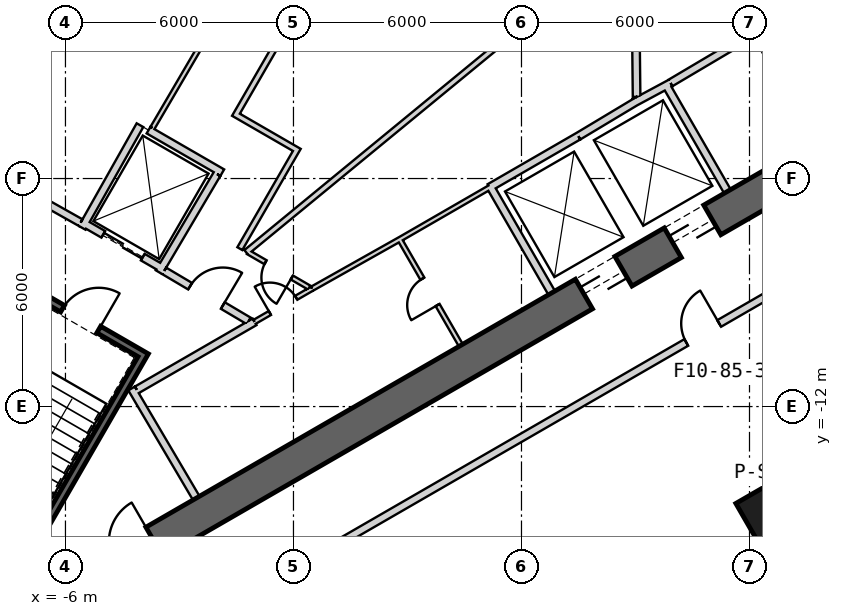
"""IFC4 building model, lengths in metres.
Left out: names, types, materials, properties, quantities, classifications, styles, units other than length and angle.
Written with IfcOpenShell. Run it as: python <this file> out.ifc"""

import sys

from ifc_helpers import new_model, si_unit, direction, frame, frame_2d, origin, origin_2d, place, context, subcontext, project, spatial, rectangle, extrude, element, fill, save


model = new_model("IFC4")
c1 = context("Model", 3, precision=1e-05, world=origin(), true_north=direction((0.0, 1.0)))
c2 = subcontext(c1, "Body", "Model", "MODEL_VIEW")
j1 = project(units=[si_unit("LENGTHUNIT", "METRE"), si_unit("PLANEANGLEUNIT", "RADIAN")], contexts=[c1])
p1 = place(None, origin())
s1 = spatial("IfcSite", under=j1, at=p1, CompositionType="ELEMENT")
p2 = place(p1, origin())
s2 = spatial("IfcBuilding", under=s1, at=p2, CompositionType="ELEMENT")
p3 = place(p2, frame((0.0, 0.0, 368.9)))
s3 = spatial("IfcBuildingStorey", under=s2, at=p3, CompositionType="ELEMENT", Elevation=368.9)
p4 = place(p3, frame((12.359, -14.942, 0.0), z_axis=(0.0, 0.0, 1.0), x_axis=(0.5, -0.866025403784, 0.0)))
e1 = element("IfcColumn", 1, at=p4, inside=s3, PredefinedType="COLUMN", context=c2, shape_type="SweptSolid", body=[
    extrude(rectangle(XDim=1.4, YDim=0.85, at=origin_2d()), origin(), (0.0, 0.0, 1.0), 3.9),
])
p5 = place(p3, frame((-7.825, -17.97, 0.0), z_axis=(0.0, 0.0, 1.0), x_axis=(0.866028369851, 0.499994862586, 0.0)))
e2 = element("IfcWall", 2, at=p5, inside=s3, PredefinedType="SHEAR", context=c2, shape_type="SweptSolid", body=[
    extrude(rectangle(XDim=31.523, YDim=0.9, at=frame_2d((15.762, 0.0))), origin(), (0.0, 0.0, 1.0), 3.9),
])
p6 = place(p5, frame((17.862, 0.0, 0.0)))
e3 = element("IfcOpeningElement", 3, at=p6, cuts=e2, PredefinedType="OPENING", context=c2, shape_type="SweptSolid", body=[
    extrude(rectangle(XDim=1.2, YDim=2.4, at=frame_2d((0.6, 1.2))), frame((0.0, 0.46, 0.0), z_axis=(0.0, -1.0, 0.0), x_axis=(1.0, 0.0, 0.0)), (0.0, 0.0, 1.0), 0.92),
])
p7 = place(p5, frame((20.562, 0.0, 0.0)))
e4 = element("IfcOpeningElement", 4, at=p7, cuts=e2, PredefinedType="OPENING", context=c2, shape_type="SweptSolid", body=[
    extrude(rectangle(XDim=1.2, YDim=2.4, at=frame_2d((0.6, 1.2))), frame((0.0, 0.46, 0.0), z_axis=(0.0, -1.0, 0.0), x_axis=(1.0, 0.0, 0.0)), (0.0, 0.0, 1.0), 0.92),
])
p8 = place(p5, frame((26.712, 0.0, 0.0)))
e5 = element("IfcOpeningElement", 5, at=p8, cuts=e2, PredefinedType="OPENING", context=c2, shape_type="SweptSolid", body=[
    extrude(rectangle(XDim=1.2, YDim=2.4, at=frame_2d((0.6, 1.2))), frame((0.0, 0.46, 0.0), z_axis=(0.0, -1.0, 0.0), x_axis=(1.0, 0.0, 0.0)), (0.0, 0.0, 1.0), 0.92),
])
p9 = place(p5, frame((3.612, 0.0, 0.0)))
e6 = element("IfcOpeningElement", 6, at=p9, cuts=e2, PredefinedType="OPENING", context=c2, shape_type="SweptSolid", body=[
    extrude(rectangle(XDim=1.2, YDim=2.4, at=frame_2d((0.6, 1.2))), frame((0.0, 0.46, 0.0), z_axis=(0.0, -1.0, 0.0), x_axis=(1.0, 0.0, 0.0)), (0.0, 0.0, 1.0), 0.92),
])
p10 = place(p3, frame((6.795, -9.01, 0.0), z_axis=(0.0, 0.0, 1.0), x_axis=(-0.499984717929, 0.866034226713, 0.0)))
e7 = element("IfcWall", 7, at=p10, inside=s3, PredefinedType="PLUMBINGWALL", context=c2, shape_type="SweptSolid", body=[
    extrude(rectangle(XDim=3.25, YDim=0.2, at=frame_2d((1.625, 0.0))), origin(), (0.0, 0.0, 1.0), 3.6),
])
p11 = place(p3, frame((5.159, -6.236, 0.0), z_axis=(0.0, 0.0, 1.0), x_axis=(0.866036505625, 0.499980770555, 0.0)))
e8 = element("IfcWall", 8, at=p11, inside=s3, PredefinedType="PLUMBINGWALL", context=c2, shape_type="SweptSolid", body=[
    extrude(rectangle(XDim=2.7, YDim=0.2, at=frame_2d((1.35, 0.0))), origin(), (0.0, 0.0, 1.0), 3.6),
])
p12 = place(p3, frame((9.795, -3.525, 0.0), z_axis=(0.0, 0.0, 1.0), x_axis=(0.499984717929, -0.866034226713, 0.0)))
e9 = element("IfcWall", 9, at=p12, inside=s3, PredefinedType="PLUMBINGWALL", context=c2, shape_type="SweptSolid", body=[
    extrude(rectangle(XDim=3.25, YDim=0.2, at=frame_2d((1.625, 0.0))), origin(), (0.0, 0.0, 1.0), 3.6),
])
p13 = place(p3, frame((8.974, -3.999, 0.0), z_axis=(0.0, 0.0, 1.0), x_axis=(0.880907015104, 0.473289373154, 0.0)))
e10 = element("IfcWall", 10, at=p13, inside=s3, PredefinedType="PLUMBINGWALL", context=c2, shape_type="SweptSolid", body=[
    extrude(rectangle(XDim=1.078, YDim=0.2, at=frame_2d((0.539, 0.0))), origin(), (0.0, 0.0, 1.0), 3.6),
])
p14 = place(p3, frame((7.493, -4.878, 0.0), z_axis=(0.0, 0.0, 1.0), x_axis=(0.859981807212, 0.510324691999, 0.0)))
e11 = element("IfcWall", 11, at=p14, inside=s3, PredefinedType="PLUMBINGWALL", context=c2, shape_type="SweptSolid", body=[
    extrude(rectangle(XDim=1.845, YDim=0.2, at=frame_2d((0.922, 0.0))), origin(), (0.0, 0.0, 1.0), 3.6),
])
p15 = place(p3, frame((-3.905, -10.563, -0.3), z_axis=(0.0, 0.0, 1.0), x_axis=(-0.500012932018, -0.866017937352, 0.0)))
e12 = element("IfcWall", 12, at=p15, inside=s3, PredefinedType="SHEAR", context=c2, shape_type="SweptSolid", body=[
    extrude(rectangle(XDim=8.1, YDim=0.2, at=frame_2d((4.05, 0.0))), origin(), (0.0, 0.0, 1.0), 3.9),
])
p16 = place(p3, frame((-4.041, -10.599, -0.3), z_axis=(0.0, 0.0, 1.0), x_axis=(-0.866047807691, 0.499961193289, 0.0)))
e13 = element("IfcWall", 13, at=p16, inside=s3, PredefinedType="SHEAR", context=c2, shape_type="SweptSolid", body=[
    extrude(rectangle(XDim=3.6, YDim=0.2, at=frame_2d((1.8, 0.0))), origin(), (0.0, 0.0, 1.0), 3.9),
])
p17 = place(p16, frame((1.25, 0.0, 0.3)))
e14 = element("IfcOpeningElement", 14, at=p17, cuts=e13, PredefinedType="OPENING", context=c2, shape_type="SweptSolid", body=[
    extrude(rectangle(XDim=1.1, YDim=2.1, at=frame_2d((0.55, 1.05))), frame((0.0, 0.11, 0.0), z_axis=(0.0, -1.0, 0.0), x_axis=(1.0, 0.0, 0.0)), (0.0, 0.0, 1.0), 0.22),
])
p18 = place(p3, frame((-3.446, -8.368, 0.0), z_axis=(0.0, 0.0, 1.0), x_axis=(-0.866024647952, 0.500001309137, 0.0)))
e15 = element("IfcWall", 15, at=p18, inside=s3, PredefinedType="PLUMBINGWALL", context=c2, shape_type="SweptSolid", body=[
    extrude(rectangle(XDim=2.4, YDim=0.2, at=frame_2d((1.2, 0.0))), origin(), (0.0, 0.0, 1.0), 3.6),
])
p19 = place(p18, frame((0.6, 0.0, 0.0)))
e16 = element("IfcOpeningElement", 16, at=p19, cuts=e15, PredefinedType="OPENING", context=c2, shape_type="SweptSolid", body=[
    extrude(rectangle(XDim=1.2, YDim=2.4, at=frame_2d((0.6, 1.2))), frame((0.0, 0.11, 0.0), z_axis=(0.0, -1.0, 0.0), x_axis=(1.0, 0.0, 0.0)), (0.0, 0.0, 1.0), 0.22),
])
p20 = place(p3, frame((-1.961, -5.796, 0.0), z_axis=(0.0, 0.0, 1.0), x_axis=(-0.508647062354, -0.860975125052, 0.0)))
e17 = element("IfcWall", 17, at=p20, inside=s3, PredefinedType="PLUMBINGWALL", context=c2, shape_type="SweptSolid", body=[
    extrude(rectangle(XDim=3.1, YDim=0.2, at=frame_2d((1.55, 0.0))), origin(), (0.0, 0.0, 1.0), 3.6),
])
p21 = place(p3, frame((-3.99, -4.509, 0.0), z_axis=(0.0, 0.0, 1.0), x_axis=(-0.491358283181, -0.870957540612, 0.0)))
e18 = element("IfcWall", 18, at=p21, inside=s3, PredefinedType="PLUMBINGWALL", context=c2, shape_type="SweptSolid", body=[
    extrude(rectangle(XDim=3.2, YDim=0.2, at=frame_2d((1.6, 0.0))), origin(), (0.0, 0.0, 1.0), 3.6),
])
p22 = place(p3, frame((-3.953, -4.646, 0.0), z_axis=(0.0, 0.0, 1.0), x_axis=(0.866065302921, -0.4999308863, 0.0)))
e19 = element("IfcWall", 19, at=p22, inside=s3, PredefinedType="PLUMBINGWALL", context=c2, shape_type="SweptSolid", body=[
    extrude(rectangle(XDim=2.264, YDim=0.2, at=frame_2d((1.132, 0.0))), origin(), (0.0, 0.0, 1.0), 3.6),
])
p23 = place(p3, frame((2.067, -11.74, 0.0), z_axis=(0.0, 0.0, 1.0), x_axis=(-0.499984717929, 0.866034226713, 0.0)))
e20 = element("IfcWall", 20, at=p23, inside=s3, PredefinedType="PARTITIONING", context=c2, shape_type="SweptSolid", body=[
    extrude(rectangle(XDim=3.25, YDim=0.12, at=frame_2d((1.625, 0.0))), origin(), (0.0, 0.0, 1.0), 3.6),
])
p24 = place(p3, frame((-4.26, -11.524, 0.0), z_axis=(0.0, 0.0, 1.0), x_axis=(0.507997497166, -0.861358544901, 0.0)))
e21 = element("IfcWall", 21, at=p24, inside=s3, PredefinedType="PARTITIONING", context=c2, shape_type="SweptSolid", body=[
    extrude(rectangle(XDim=3.35, YDim=0.2, at=frame_2d((1.675, 0.0))), origin(), (0.0, 0.0, 1.0), 3.6),
])
p25 = place(p3, frame((-1.024, -9.771, 0.0), z_axis=(0.0, 0.0, 1.0), x_axis=(-0.866029903013, -0.499992207027, 0.0)))
e22 = element("IfcWall", 22, at=p25, inside=s3, PredefinedType="PARTITIONING", context=c2, shape_type="SweptSolid", body=[
    extrude(rectangle(XDim=3.578, YDim=0.2, at=frame_2d((1.789, 0.0))), origin(), (0.0, 0.0, 1.0), 3.6),
])
p26 = place(p25, frame((1.389, 0.0, 0.0)))
e23 = element("IfcOpeningElement", 23, at=p26, cuts=e22, PredefinedType="OPENING", context=c2, shape_type="SweptSolid", body=[
    extrude(rectangle(XDim=0.8, YDim=2.1, at=frame_2d((0.4, 1.05))), frame((0.0, 0.11, 0.0), z_axis=(0.0, -1.0, 0.0), x_axis=(1.0, 0.0, 0.0)), (0.0, 0.0, 1.0), 0.22),
])
p27 = place(p3, frame((-1.023, -9.772, 0.0), z_axis=(0.0, 0.0, 1.0), x_axis=(0.874290944206, 0.485402250592, 0.0)))
e24 = element("IfcWall", 24, at=p27, inside=s3, PredefinedType="PARTITIONING", context=c2, shape_type="SweptSolid", body=[
    extrude(rectangle(XDim=1.723, YDim=0.12, at=frame_2d((0.861, 0.0))), origin(), (0.0, 0.0, 1.0), 3.6),
])
p28 = place(p3, frame((0.483, -8.936, 0.0), z_axis=(0.0, 0.0, 1.0), x_axis=(0.866028230842, 0.499995103361, 0.0)))
e25 = element("IfcWall", 25, at=p28, inside=s3, PredefinedType="PARTITIONING", context=c2, shape_type="SweptSolid", body=[
    extrude(rectangle(XDim=5.4, YDim=0.12, at=frame_2d((2.7, 0.0))), origin(), (0.0, 0.0, 1.0), 3.6),
])
p29 = place(p28, frame((2.3, 0.0, 0.0)))
e26 = element("IfcOpeningElement", 26, at=p29, cuts=e25, PredefinedType="OPENING", context=c2, shape_type="SweptSolid", body=[
    extrude(rectangle(XDim=0.8, YDim=2.1, at=frame_2d((0.4, 1.05))), frame((0.0, 0.07, 0.0), z_axis=(0.0, -1.0, 0.0), x_axis=(1.0, 0.0, 0.0)), (0.0, 0.0, 1.0), 0.14),
])
p30 = place(p3, frame((12.245, -2.109, 0.0), z_axis=(0.0, 0.0, 1.0), x_axis=(-0.860414880418, -0.509594185166, 0.0)))
e27 = element("IfcWall", 27, at=p30, inside=s3, PredefinedType="PARTITIONING", context=c2, shape_type="SweptSolid", body=[
    extrude(rectangle(XDim=2.7, YDim=0.2, at=frame_2d((1.35, 0.0))), origin(), (0.0, 0.0, 1.0), 3.6),
])
p31 = place(p3, frame((13.758, -4.99, 0.0), z_axis=(0.0, 0.0, 1.0), x_axis=(-0.491993409184, 0.87059892334, 0.0)))
e28 = element("IfcWall", 28, at=p31, inside=s3, PredefinedType="PARTITIONING", context=c2, shape_type="SweptSolid", body=[
    extrude(rectangle(XDim=3.15, YDim=0.2, at=frame_2d((1.575, 0.0))), origin(), (0.0, 0.0, 1.0), 3.6),
])
p32 = place(p31, frame((1.175, 0.0, 0.0)))
e29 = element("IfcOpeningElement", 29, at=p32, cuts=e28, PredefinedType="OPENING", context=c2, shape_type="SweptSolid", body=[
    extrude(rectangle(XDim=0.8, YDim=2.1, at=frame_2d((0.4, 1.05))), frame((0.0, 0.11, 0.0), z_axis=(0.0, -1.0, 0.0), x_axis=(1.0, 0.0, 0.0)), (0.0, 0.0, 1.0), 0.22),
])
p33 = place(p3, frame((9.029, -3.851, 0.0), z_axis=(0.0, 0.0, 1.0), x_axis=(-0.010783593937, 0.99994185536, 0.0)))
e30 = element("IfcWall", 30, at=p33, inside=s3, PredefinedType="PARTITIONING", context=c2, shape_type="SweptSolid", body=[
    extrude(rectangle(XDim=2.581, YDim=0.2, at=frame_2d((1.291, 0.0))), origin(), (0.0, 0.0, 1.0), 3.6),
])
p34 = place(p33, frame((0.791, 0.0, 0.0)))
e31 = element("IfcOpeningElement", 31, at=p34, cuts=e30, PredefinedType="OPENING", context=c2, shape_type="SweptSolid", body=[
    extrude(rectangle(XDim=1.0, YDim=2.1, at=frame_2d((0.5, 1.05))), frame((0.0, 0.11, 0.0), z_axis=(0.0, -1.0, 0.0), x_axis=(1.0, 0.0, 0.0)), (0.0, 0.0, 1.0), 0.22),
])
p35 = place(p3, frame((-3.401, -8.43, 0.0), z_axis=(0.0, 0.0, 1.0), x_axis=(0.860630814782, -0.509229418482, 0.0)))
e32 = element("IfcWall", 32, at=p35, inside=s3, PredefinedType="PARTITIONING", context=c2, shape_type="SweptSolid", body=[
    extrude(rectangle(XDim=2.582, YDim=0.2, at=frame_2d((1.291, 0.0))), origin(), (0.0, 0.0, 1.0), 3.6),
])
p36 = place(p3, frame((-7.849, -5.894, 0.0), z_axis=(0.0, 0.0, 1.0), x_axis=(0.871363259478, -0.490638431059, 0.0)))
e33 = element("IfcWall", 33, at=p36, inside=s3, PredefinedType="PARTITIONING", context=c2, shape_type="SweptSolid", body=[
    extrude(rectangle(XDim=2.581, YDim=0.2, at=frame_2d((1.291, 0.0))), origin(), (0.0, 0.0, 1.0), 3.6),
])
p37 = place(p36, frame((0.791, 0.0, 0.0)))
e34 = element("IfcOpeningElement", 34, at=p37, cuts=e33, PredefinedType="OPENING", context=c2, shape_type="SweptSolid", body=[
    extrude(rectangle(XDim=1.0, YDim=2.1, at=frame_2d((0.5, 1.05))), frame((0.0, 0.11, 0.0), z_axis=(0.0, -1.0, 0.0), x_axis=(1.0, 0.0, 0.0)), (0.0, 0.0, 1.0), 0.22),
])
p38 = place(p3, frame((0.224, -1.761, 0.0), z_axis=(0.0, 0.0, 1.0), x_axis=(-0.494327216836, -0.869275907118, 0.0)))
e35 = element("IfcWall", 35, at=p38, inside=s3, PredefinedType="PARTITIONING", context=c2, shape_type="SweptSolid", body=[
    extrude(rectangle(XDim=4.487, YDim=0.12, at=frame_2d((2.244, 0.0))), origin(), (0.0, 0.0, 1.0), 3.6),
])
p39 = place(p38, frame((1.895, 0.0, 0.0)))
e36 = element("IfcOpeningElement", 36, at=p39, cuts=e35, PredefinedType="OPENING", context=c2, shape_type="SweptSolid", body=[
    extrude(rectangle(XDim=0.8, YDim=2.1, at=frame_2d((0.4, 1.05))), frame((0.0, 0.07, 0.0), z_axis=(0.0, -1.0, 0.0), x_axis=(1.0, 0.0, 0.0)), (0.0, 0.0, 1.0), 0.14),
])
p40 = place(p3, frame((4.5, -2.76, 0.0), z_axis=(0.0, 0.0, 1.0), x_axis=(0.0, 1.0, 0.0)))
e37 = element("IfcWall", 37, at=p40, inside=s3, PredefinedType="PARTITIONING", context=c2, shape_type="SweptSolid", body=[
    extrude(rectangle(XDim=1.625, YDim=0.12, at=frame_2d((0.812, 0.0))), origin(), (0.0, 0.0, 1.0), 3.6),
])
p41 = place(p3, frame((7.56, -2.7, 0.0), z_axis=(0.0, 0.0, 1.0), x_axis=(-1.0, 0.0, 0.0)))
e38 = element("IfcWall", 38, at=p41, inside=s3, PredefinedType="PARTITIONING", context=c2, shape_type="SweptSolid", body=[
    extrude(rectangle(XDim=3.0, YDim=0.12, at=frame_2d((1.5, 0.0))), origin(), (0.0, 0.0, 1.0), 3.6),
])
p42 = place(p3, frame((7.475, -4.865, 0.0), z_axis=(0.0, 0.0, 1.0), x_axis=(0.011716133148, 0.999931363757, 0.0)))
e39 = element("IfcWall", 39, at=p42, inside=s3, PredefinedType="PARTITIONING", context=c2, shape_type="SweptSolid", body=[
    extrude(rectangle(XDim=2.105, YDim=0.12, at=frame_2d((1.052, 0.0))), origin(), (0.0, 0.0, 1.0), 3.6),
])
p43 = place(p3, frame((-3.219, -3.425, 0.0), z_axis=(0.0, 0.0, 1.0), x_axis=(0.499996236806, 0.866027576455, 0.0)))
e40 = element("IfcWall", 40, at=p43, inside=s3, PredefinedType="PLUMBINGWALL", context=c2, shape_type="SweptSolid", body=[
    extrude(rectangle(XDim=3.036, YDim=0.15, at=frame_2d((1.518, 0.0))), origin(), (0.0, 0.0, 1.0), 3.6),
])
p44 = place(p43, frame((1.156, 0.0, 0.0)))
e41 = element("IfcOpeningElement", 41, at=p44, cuts=e40, PredefinedType="OPENING", context=c2, shape_type="SweptSolid", body=[
    extrude(rectangle(XDim=0.8, YDim=2.1, at=frame_2d((0.4, 1.05))), frame((0.0, 0.085, 0.0), z_axis=(0.0, -1.0, 0.0), x_axis=(1.0, 0.0, 0.0)), (0.0, 0.0, 1.0), 0.17),
])
p45 = place(p3, frame((-4.653, -2.51, 0.0), z_axis=(0.0, 0.0, 1.0), x_axis=(0.866053003207, -0.499952193351, 0.0)))
e42 = element("IfcWall", 42, at=p45, inside=s3, PredefinedType="PLUMBINGWALL", context=c2, shape_type="SweptSolid", body=[
    extrude(rectangle(XDim=1.625, YDim=0.15, at=frame_2d((0.812, 0.0))), origin(), (0.0, 0.0, 1.0), 3.6),
])
p46 = place(p3, frame((-6.126, -5.21, 0.0), z_axis=(0.0, 0.0, 1.0), x_axis=(0.499990139034, 0.866031096941, 0.0)))
e43 = element("IfcWall", 43, at=p46, inside=s3, PredefinedType="PLUMBINGWALL", context=c2, shape_type="SweptSolid", body=[
    extrude(rectangle(XDim=3.0, YDim=0.15, at=frame_2d((1.5, 0.0))), origin(), (0.0, 0.0, 1.0), 3.6),
])
p47 = place(p3, frame((-7.95, -4.041, 0.0), z_axis=(0.0, 0.0, 1.0), x_axis=(0.860090281069, -0.510141851263, 0.0)))
e44 = element("IfcWall", 44, at=p47, inside=s3, PredefinedType="PLUMBINGWALL", context=c2, shape_type="SweptSolid", body=[
    extrude(rectangle(XDim=2.089, YDim=0.15, at=frame_2d((1.045, 0.0))), origin(), (0.0, 0.0, 1.0), 3.6),
])
p48 = place(p3, frame((-6.852, -20.93, 0.0), z_axis=(0.0, 0.0, 1.0), x_axis=(0.866025322732, 0.500000140387, 0.0)))
e45 = element("IfcWall", 45, at=p48, inside=s3, PredefinedType="PARTITIONING", context=c2, shape_type="SweptSolid", body=[
    extrude(rectangle(XDim=22.857, YDim=0.2, at=frame_2d((11.428, 0.0))), origin(), (0.0, 0.0, 1.0), 2.97),
])
p49 = place(p48, frame((10.9, 0.0, 0.0)))
e46 = element("IfcOpeningElement", 46, at=p49, cuts=e45, PredefinedType="OPENING", context=c2, shape_type="SweptSolid", body=[
    extrude(rectangle(XDim=1.0, YDim=2.1, at=frame_2d((0.5, 1.05))), frame((0.0, 0.11, 0.0), z_axis=(0.0, -1.0, 0.0), x_axis=(1.0, 0.0, 0.0)), (0.0, 0.0, 1.0), 0.22),
])
p50 = place(p34, origin())
e47 = element("IfcDoor", 47, at=p50, inside=s3, OperationType="SINGLE_SWING_RIGHT", PredefinedType="USERDEFINED", context=c2, shape_type="SweptSolid", body=[
    extrude(rectangle(XDim=1.0, YDim=2.1, at=frame_2d((0.5, 1.05))), frame((0.0, 0.025, 0.0), z_axis=(0.0, -1.0, 0.0), x_axis=(1.0, 0.0, 0.0)), (0.0, 0.0, 1.0), 0.05),
])
fill(e31, e47)
p51 = place(p17, origin())
e48 = element("IfcDoor", 48, at=p51, inside=s3, OperationType="SINGLE_SWING_LEFT", PredefinedType="USERDEFINED", context=c2, shape_type="SweptSolid", body=[
    extrude(rectangle(XDim=1.1, YDim=2.1, at=frame_2d((0.55, 1.05))), frame((0.0, 0.025, 0.0), z_axis=(0.0, -1.0, 0.0), x_axis=(1.0, 0.0, 0.0)), (0.0, 0.0, 1.0), 0.05),
])
fill(e14, e48)
p52 = place(p37, origin())
e49 = element("IfcDoor", 49, at=p52, inside=s3, OperationType="SINGLE_SWING_RIGHT", PredefinedType="USERDEFINED", context=c2, shape_type="SweptSolid", body=[
    extrude(rectangle(XDim=1.0, YDim=2.1, at=frame_2d((0.5, 1.05))), frame((0.0, 0.025, 0.0), z_axis=(0.0, -1.0, 0.0), x_axis=(1.0, 0.0, 0.0)), (0.0, 0.0, 1.0), 0.05),
])
fill(e34, e49)
p53 = place(p19, origin())
e50 = element("IfcDoor", 50, at=p53, inside=s3, OperationType="SLIDING_TO_LEFT", PredefinedType="USERDEFINED", context=c2, shape_type="SweptSolid", body=[
    extrude(rectangle(XDim=1.2, YDim=2.4, at=frame_2d((0.6, 1.2))), frame((0.0, 0.025, 0.0), z_axis=(0.0, -1.0, 0.0), x_axis=(1.0, 0.0, 0.0)), (0.0, 0.0, 1.0), 0.05),
])
fill(e16, e50)
p54 = place(p39, origin())
e51 = element("IfcDoor", 51, at=p54, inside=s3, OperationType="SINGLE_SWING_RIGHT", PredefinedType="USERDEFINED", context=c2, shape_type="SweptSolid", body=[
    extrude(rectangle(XDim=0.8, YDim=2.1, at=frame_2d((0.4, 1.05))), frame((0.0, 0.025, 0.0), z_axis=(0.0, -1.0, 0.0), x_axis=(1.0, 0.0, 0.0)), (0.0, 0.0, 1.0), 0.05),
])
fill(e36, e51)
p55 = place(p26, origin())
e52 = element("IfcDoor", 52, at=p55, inside=s3, OperationType="SINGLE_SWING_LEFT", PredefinedType="USERDEFINED", context=c2, shape_type="SweptSolid", body=[
    extrude(rectangle(XDim=0.8, YDim=2.1, at=frame_2d((0.4, 1.05))), frame((0.0, 0.025, 0.0), z_axis=(0.0, -1.0, 0.0), x_axis=(1.0, 0.0, 0.0)), (0.0, 0.0, 1.0), 0.05),
])
fill(e23, e52)
p56 = place(p29, origin())
e53 = element("IfcDoor", 53, at=p56, inside=s3, OperationType="SINGLE_SWING_LEFT", PredefinedType="USERDEFINED", context=c2, shape_type="SweptSolid", body=[
    extrude(rectangle(XDim=0.8, YDim=2.1, at=frame_2d((0.4, 1.05))), frame((0.0, 0.025, 0.0), z_axis=(0.0, -1.0, 0.0), x_axis=(1.0, 0.0, 0.0)), (0.0, 0.0, 1.0), 0.05),
])
fill(e26, e53)
p57 = place(p49, origin())
e54 = element("IfcDoor", 54, at=p57, inside=s3, OperationType="SINGLE_SWING_LEFT", PredefinedType="USERDEFINED", context=c2, shape_type="SweptSolid", body=[
    extrude(rectangle(XDim=1.0, YDim=2.1, at=frame_2d((0.5, 1.05))), frame((0.0, 0.025, 0.0), z_axis=(0.0, -1.0, 0.0), x_axis=(1.0, 0.0, 0.0)), (0.0, 0.0, 1.0), 0.05),
])
fill(e46, e54)
p58 = place(p6, origin())
e55 = element("IfcDoor", 55, at=p58, inside=s3, OperationType="SLIDING_TO_LEFT", PredefinedType="USERDEFINED", context=c2, shape_type="SweptSolid", body=[
    extrude(rectangle(XDim=1.2, YDim=2.4, at=frame_2d((0.6, 1.2))), frame((0.0, 0.025, 0.0), z_axis=(0.0, -1.0, 0.0), x_axis=(1.0, 0.0, 0.0)), (0.0, 0.0, 1.0), 0.05),
])
fill(e3, e55)
p59 = place(p7, origin())
e56 = element("IfcDoor", 56, at=p59, inside=s3, OperationType="SLIDING_TO_LEFT", PredefinedType="USERDEFINED", context=c2, shape_type="SweptSolid", body=[
    extrude(rectangle(XDim=1.2, YDim=2.4, at=frame_2d((0.6, 1.2))), frame((0.0, 0.025, 0.0), z_axis=(0.0, -1.0, 0.0), x_axis=(1.0, 0.0, 0.0)), (0.0, 0.0, 1.0), 0.05),
])
fill(e4, e56)
save(model, sys.argv[1])
